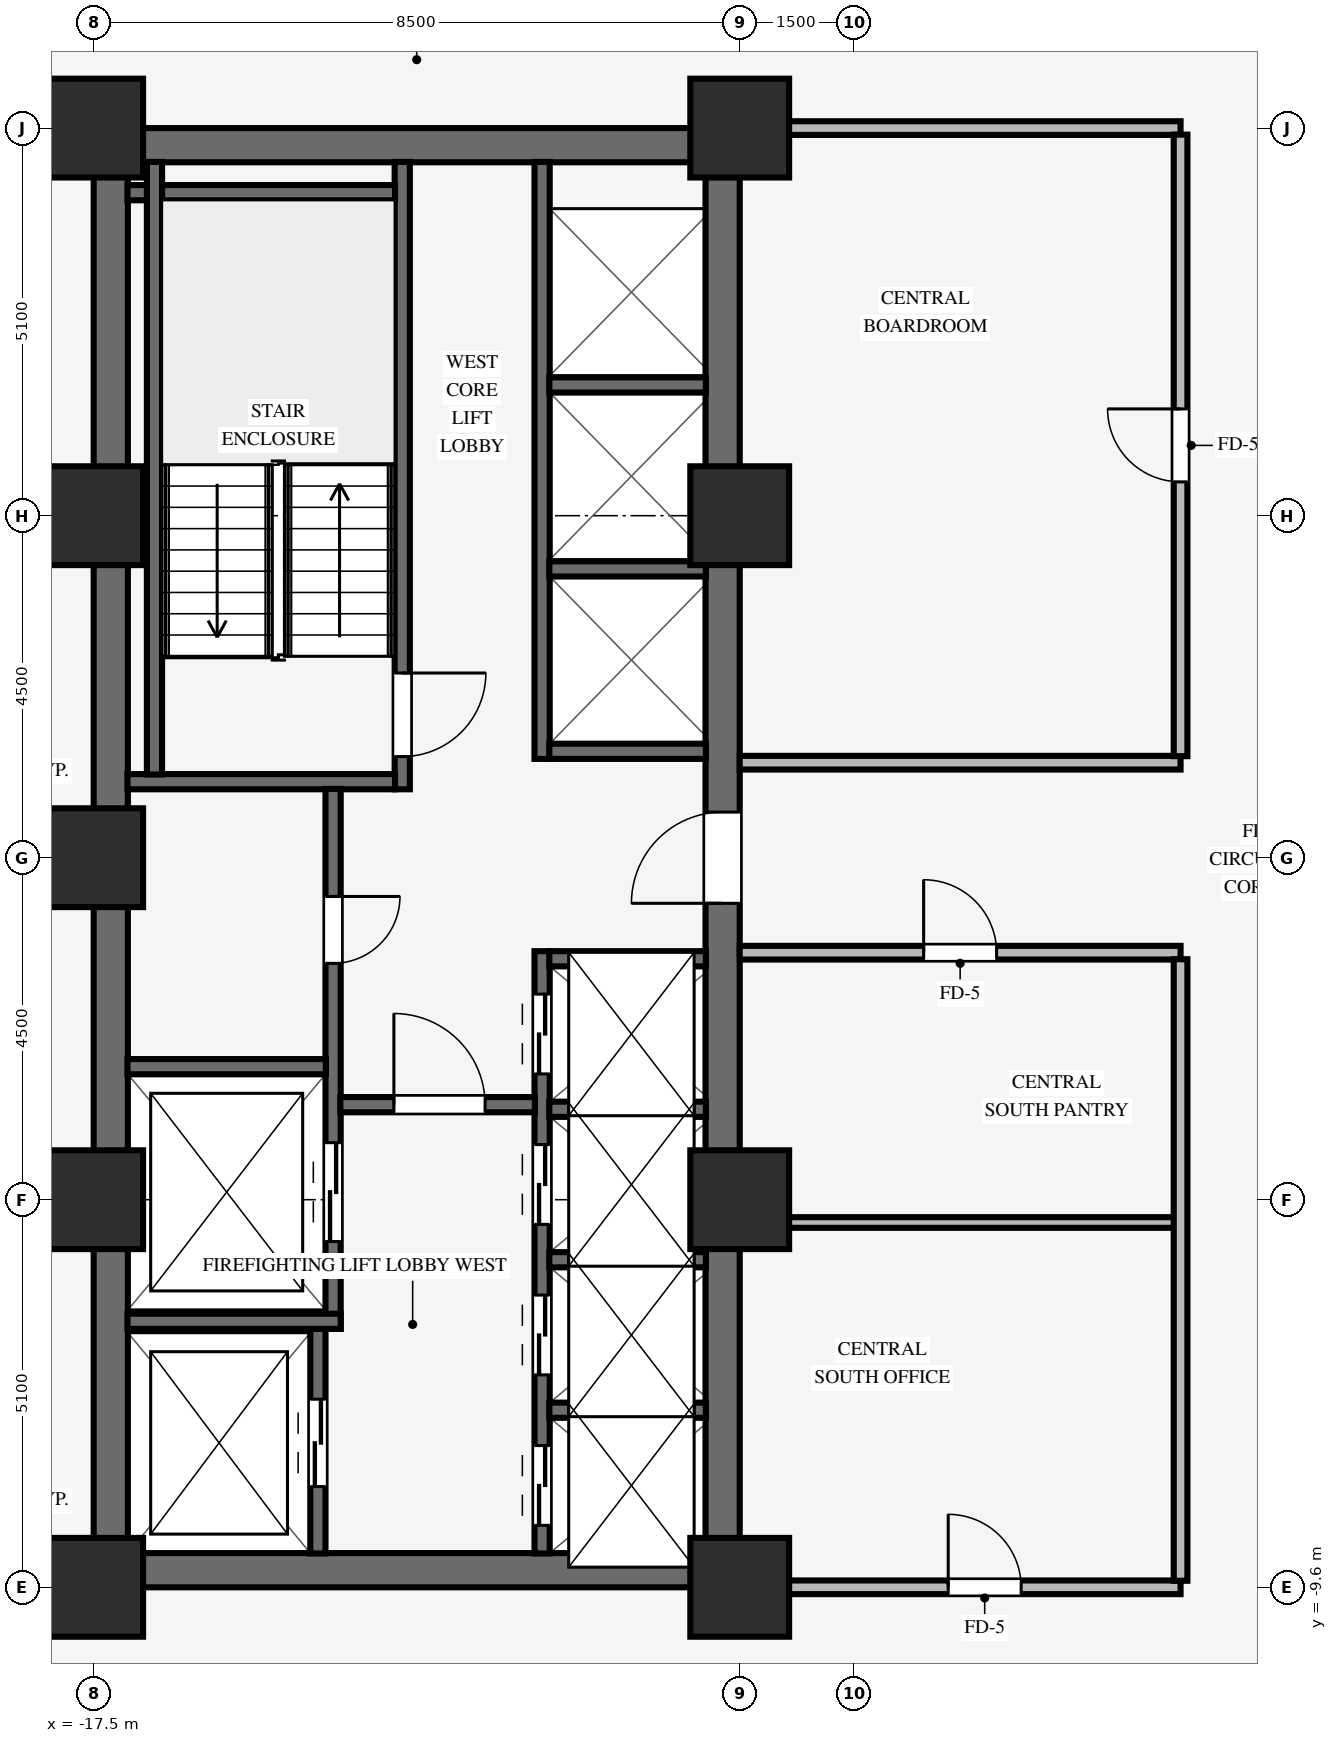
"""IFC4 building model, lengths in metres.
Left out: names, types, materials, properties, quantities, classifications, styles, units other than length and angle.
Written with IfcOpenShell. Run it as: python <this file> out.ifc"""

import sys

from ifc_helpers import new_model, si_unit, direction, frame, frame_2d, origin, origin_2d, place, context, subcontext, project, spatial, rectangle, extrude, source, transform, mapped, element, fill, save


model = new_model("IFC4")
c1 = context("Model", 3, precision=1e-05, world=origin(), true_north=direction((0.0, 1.0)))
c2 = subcontext(c1, "Body", "Model", "MODEL_VIEW")
j1 = project(units=[si_unit("LENGTHUNIT", "METRE"), si_unit("PLANEANGLEUNIT", "RADIAN")], contexts=[c1])
p1 = place(None, origin())
s1 = spatial("IfcSite", under=j1, at=p1, CompositionType="ELEMENT")
p2 = place(p1, origin())
s2 = spatial("IfcBuilding", under=s1, at=p2, CompositionType="ELEMENT")
p3 = place(p2, frame((0.0, 0.0, 53.15)))
s3 = spatial("IfcBuildingStorey", under=s2, at=p3, CompositionType="ELEMENT", Elevation=53.15)
for number, where, z_axis, x_axis in (
    (1, (-17.5, -9.375, 0.0), (0.0, 0.0, 1.0), (1.0, 0.0, 0.0)),
    (2, (-17.5, 9.375, 0.0), (0.0, 0.0, 1.0), (1.0, 0.0, 0.0)),
):
    element("IfcWall", number, at=place(p3, frame(where, z_axis=z_axis, x_axis=x_axis)), inside=s3, PredefinedType="SHEAR", context=c2, shape_type="SweptSolid", body=[
        extrude(rectangle(XDim=8.5, YDim=0.45, at=frame_2d((4.25, 0.0))), origin(), (0.0, 0.0, 1.0), 3.25),
    ])
p4 = place(p3, frame((-17.275, -9.155, 0.0), z_axis=(0.0, 0.0, 1.0), x_axis=(0.0, 1.0, 0.0)))
e3 = element("IfcWall", 3, at=p4, inside=s3, PredefinedType="SHEAR", context=c2, shape_type="SweptSolid", body=[
    extrude(rectangle(XDim=18.31, YDim=0.45, at=frame_2d((9.155, 0.0))), origin(), (0.0, 0.0, 1.0), 3.25),
])
p5 = place(p3, frame((-9.225, -9.155, 0.0), z_axis=(0.0, 0.0, 1.0), x_axis=(0.0, 1.0, 0.0)))
e4 = element("IfcWall", 4, at=p5, inside=s3, PredefinedType="SHEAR", context=c2, shape_type="SweptSolid", body=[
    extrude(rectangle(XDim=18.31, YDim=0.45, at=frame_2d((9.155, 0.0))), origin(), (0.0, 0.0, 1.0), 3.25),
])
p6 = place(p5, frame((8.555, 0.0, 0.0)))
e5 = element("IfcOpeningElement", 5, at=p6, cuts=e4, PredefinedType="OPENING", context=c2, shape_type="SweptSolid", body=[
    extrude(rectangle(XDim=1.2, YDim=2.15, at=frame_2d((0.6, 1.075))), frame((0.0, 0.235, 0.0), z_axis=(0.0, -1.0, 0.0), x_axis=(1.0, 0.0, 0.0)), (0.0, 0.0, 1.0), 0.47),
])
for number, where, z_axis, x_axis in (
    (6, (-17.5, -9.6, 0.0), (0.0, 0.0, 1.0), (1.0, 0.0, 0.0)),
    (7, (-17.5, -4.5, 0.0), (0.0, 0.0, 1.0), (1.0, 0.0, 0.0)),
    (8, (-17.5, 4.5, 0.0), (0.0, 0.0, 1.0), (1.0, 0.0, 0.0)),
    (9, (-17.5, 9.6, 0.0), (0.0, 0.0, 1.0), (1.0, 0.0, 0.0)),
    (10, (-9.0, -9.6, 0.0), (0.0, 0.0, 1.0), (1.0, 0.0, 0.0)),
    (11, (-9.0, -4.5, 0.0), (0.0, 0.0, 1.0), (1.0, 0.0, 0.0)),
    (12, (-9.0, 4.5, 0.0), (0.0, 0.0, 1.0), (1.0, 0.0, 0.0)),
    (13, (-9.0, 9.6, 0.0), (0.0, 0.0, 1.0), (1.0, 0.0, 0.0)),
    (14, (-17.5, 0.0, 0.0), (0.0, 0.0, 1.0), (1.0, 0.0, 0.0)),
):
    element("IfcColumn", number, at=place(p3, frame(where, z_axis=z_axis, x_axis=x_axis)), inside=s3, PredefinedType="COLUMN", context=c2, shape_type="SweptSolid", body=[
        extrude(rectangle(XDim=1.3, YDim=1.3, at=origin_2d()), origin(), (0.0, 0.0, 1.0), 3.25),
    ])
p7 = place(p3, frame((-13.44, 0.9, 0.0), z_axis=(0.0, 0.0, 1.0), x_axis=(0.0, 1.0, 0.0)))
e15 = element("IfcWall", 15, at=p7, inside=s3, PredefinedType="SHEAR", context=c2, shape_type="SweptSolid", body=[
    extrude(rectangle(XDim=8.255, YDim=0.2, at=frame_2d((4.127, 0.0))), origin(), (0.0, 0.0, 1.0), 3.25),
])
p8 = place(p7, frame((1.53, 0.0, 0.0), z_axis=(0.0, 0.0, 1.0), x_axis=(-1.0, 0.0, 0.0)))
e16 = element("IfcOpeningElement", 16, at=p8, cuts=e15, PredefinedType="OPENING", context=c2, shape_type="SweptSolid", body=[
    extrude(rectangle(XDim=1.1, YDim=2.15, at=frame_2d((0.55, 1.075))), frame((0.0, 0.11, 0.0), z_axis=(0.0, -1.0, 0.0), x_axis=(1.0, 0.0, 0.0)), (0.0, 0.0, 1.0), 0.22),
])
for number, where, z_axis, x_axis in (
    (17, (-17.055, 1.0, 0.0), (0.0, 0.0, 1.0), (1.0, 0.0, 0.0)),
    (18, (-17.055, 8.75, 0.0), (0.0, 0.0, 1.0), (1.0, 0.0, 0.0)),
):
    element("IfcWall", number, at=place(p3, frame(where, z_axis=z_axis, x_axis=x_axis)), inside=s3, PredefinedType="SHEAR", context=c2, shape_type="SweptSolid", body=[
        extrude(rectangle(XDim=3.52, YDim=0.2, at=frame_2d((1.76, 0.0))), origin(), (0.0, 0.0, 1.0), 3.25),
    ])
p9 = place(p3, frame((-16.7, 1.095, 0.0), z_axis=(0.0, 0.0, 1.0), x_axis=(0.0, 1.0, 0.0)))
e19 = element("IfcWall", 19, at=p9, inside=s3, PredefinedType="SHEAR", context=c2, shape_type="SweptSolid", body=[
    extrude(rectangle(XDim=8.06, YDim=0.2, at=frame_2d((4.03, 0.0))), origin(), (0.0, 0.0, 1.0), 3.25),
])
p10 = place(p3, frame((-14.55, -9.155, 0.0), z_axis=(0.0, 0.0, 1.0), x_axis=(0.0, 1.0, 0.0)))
e20 = element("IfcWall", 20, at=p10, inside=s3, PredefinedType="SHEAR", context=c2, shape_type="SweptSolid", body=[
    extrude(rectangle(XDim=2.96, YDim=0.2, at=frame_2d((1.48, 0.0))), origin(), (0.0, 0.0, 1.0), 3.25),
])
p11 = place(p10, frame((0.88, 0.0, 0.0)))
e21 = element("IfcOpeningElement", 21, at=p11, cuts=e20, PredefinedType="OPENING", context=c2, shape_type="SweptSolid", body=[
    extrude(rectangle(XDim=1.15, YDim=2.15, at=frame_2d((0.575, 1.075))), frame((0.0, 0.11, 0.0), z_axis=(0.0, -1.0, 0.0), x_axis=(1.0, 0.0, 0.0)), (0.0, 0.0, 1.0), 0.22),
])
p12 = place(p3, frame((-14.35, -6.2, 0.0), z_axis=(0.0, 0.0, 1.0), x_axis=(0.0, 1.0, 0.0)))
e22 = element("IfcWall", 22, at=p12, inside=s3, PredefinedType="SHEAR", context=c2, shape_type="SweptSolid", body=[
    extrude(rectangle(XDim=7.105, YDim=0.2, at=frame_2d((3.552, 0.0))), origin(), (0.0, 0.0, 1.0), 3.25),
])
p13 = place(p12, frame((5.69, 0.0, 0.0), z_axis=(0.0, 0.0, 1.0), x_axis=(-1.0, 0.0, 0.0)))
e23 = element("IfcOpeningElement", 23, at=p13, cuts=e22, PredefinedType="OPENING", context=c2, shape_type="SweptSolid", body=[
    extrude(rectangle(XDim=0.88, YDim=2.1, at=frame_2d((0.44, 1.05))), frame((0.0, 0.11, 0.0), z_axis=(0.0, -1.0, 0.0), x_axis=(1.0, 0.0, 0.0)), (0.0, 0.0, 1.0), 0.22),
])
p14 = place(p12, frame((1.15, 0.0, 0.0)))
e24 = element("IfcOpeningElement", 24, at=p14, cuts=e22, PredefinedType="OPENING", context=c2, shape_type="SweptSolid", body=[
    extrude(rectangle(XDim=1.3, YDim=2.2, at=frame_2d((0.65, 1.1))), frame((0.0, 0.11, 0.0), z_axis=(0.0, -1.0, 0.0), x_axis=(1.0, 0.0, 0.0)), (0.0, 0.0, 1.0), 0.22),
])
p15 = place(p3, frame((-17.055, -6.1, 0.0), z_axis=(0.0, 0.0, 1.0), x_axis=(1.0, 0.0, 0.0)))
e25 = element("IfcWall", 25, at=p15, inside=s3, PredefinedType="SHEAR", context=c2, shape_type="SweptSolid", body=[
    extrude(rectangle(XDim=2.805, YDim=0.2, at=frame_2d((1.402, 0.0))), origin(), (0.0, 0.0, 1.0), 3.25),
])
p16 = place(p3, frame((-17.055, -2.75, 0.0), z_axis=(0.0, 0.0, 1.0), x_axis=(1.0, 0.0, 0.0)))
e26 = element("IfcWall", 26, at=p16, inside=s3, PredefinedType="SHEAR", context=c2, shape_type="SweptSolid", body=[
    extrude(rectangle(XDim=2.61, YDim=0.2, at=frame_2d((1.305, 0.0))), origin(), (0.0, 0.0, 1.0), 3.25),
])
p17 = place(p3, frame((-11.6, -9.155, 0.0), z_axis=(0.0, 0.0, 1.0), x_axis=(0.0, 1.0, 0.0)))
e27 = element("IfcWall", 27, at=p17, inside=s3, PredefinedType="SHEAR", context=c2, shape_type="SweptSolid", body=[
    extrude(rectangle(XDim=7.925, YDim=0.2, at=frame_2d((3.962, 0.0))), origin(), (0.0, 0.0, 1.0), 3.25),
])
p18 = place(p17, frame((0.37, 0.0, 0.0)))
e28 = element("IfcOpeningElement", 28, at=p18, cuts=e27, PredefinedType="OPENING", context=c2, shape_type="SweptSolid", body=[
    extrude(rectangle(XDim=1.05, YDim=2.15, at=frame_2d((0.525, 1.075))), frame((0.0, 0.11, 0.0), z_axis=(0.0, -1.0, 0.0), x_axis=(1.0, 0.0, 0.0)), (0.0, 0.0, 1.0), 0.22),
])
p19 = place(p17, frame((2.35, 0.0, 0.0)))
e29 = element("IfcOpeningElement", 29, at=p19, cuts=e27, PredefinedType="OPENING", context=c2, shape_type="SweptSolid", body=[
    extrude(rectangle(XDim=1.05, YDim=2.15, at=frame_2d((0.525, 1.075))), frame((0.0, 0.11, 0.0), z_axis=(0.0, -1.0, 0.0), x_axis=(1.0, 0.0, 0.0)), (0.0, 0.0, 1.0), 0.22),
])
p20 = place(p17, frame((4.33, 0.0, 0.0)))
e30 = element("IfcOpeningElement", 30, at=p20, cuts=e27, PredefinedType="OPENING", context=c2, shape_type="SweptSolid", body=[
    extrude(rectangle(XDim=1.05, YDim=2.15, at=frame_2d((0.525, 1.075))), frame((0.0, 0.11, 0.0), z_axis=(0.0, -1.0, 0.0), x_axis=(1.0, 0.0, 0.0)), (0.0, 0.0, 1.0), 0.22),
])
p21 = place(p17, frame((6.31, 0.0, 0.0)))
e31 = element("IfcOpeningElement", 31, at=p21, cuts=e27, PredefinedType="OPENING", context=c2, shape_type="SweptSolid", body=[
    extrude(rectangle(XDim=1.05, YDim=2.15, at=frame_2d((0.525, 1.075))), frame((0.0, 0.11, 0.0), z_axis=(0.0, -1.0, 0.0), x_axis=(1.0, 0.0, 0.0)), (0.0, 0.0, 1.0), 0.22),
])
p22 = place(p3, frame((-14.255, -3.25, 0.0), z_axis=(0.0, 0.0, 1.0), x_axis=(1.0, 0.0, 0.0)))
e32 = element("IfcWall", 32, at=p22, inside=s3, PredefinedType="SHEAR", context=c2, shape_type="SweptSolid", body=[
    extrude(rectangle(XDim=2.56, YDim=0.2, at=frame_2d((1.28, 0.0))), origin(), (0.0, 0.0, 1.0), 3.25),
])
p23 = place(p22, frame((0.705, 0.0, 0.0)))
e33 = element("IfcOpeningElement", 33, at=p23, cuts=e32, PredefinedType="OPENING", context=c2, shape_type="SweptSolid", body=[
    extrude(rectangle(XDim=1.2, YDim=2.15, at=frame_2d((0.6, 1.075))), frame((0.0, 0.11, 0.0), z_axis=(0.0, -1.0, 0.0), x_axis=(1.0, 0.0, 0.0)), (0.0, 0.0, 1.0), 0.22),
])
for number, where, z_axis, x_axis in (
    (34, (-11.505, -7.27, 0.0), (0.0, 0.0, 1.0), (1.0, 0.0, 0.0)),
    (35, (-11.505, -5.29, 0.0), (0.0, 0.0, 1.0), (1.0, 0.0, 0.0)),
    (36, (-11.505, -3.31, 0.0), (0.0, 0.0, 1.0), (1.0, 0.0, 0.0)),
    (37, (-11.505, -1.33, 0.0), (0.0, 0.0, 1.0), (1.0, 0.0, 0.0)),
):
    element("IfcWall", number, at=place(p3, frame(where, z_axis=z_axis, x_axis=x_axis)), inside=s3, PredefinedType="SHEAR", context=c2, shape_type="SweptSolid", body=[
        extrude(rectangle(XDim=2.06, YDim=0.2, at=frame_2d((1.03, 0.0))), origin(), (0.0, 0.0, 1.0), 3.25),
    ])
p24 = place(p3, frame((-11.6, 1.3, 0.0), z_axis=(0.0, 0.0, 1.0), x_axis=(0.0, 1.0, 0.0)))
e38 = element("IfcWall", 38, at=p24, inside=s3, PredefinedType="SHEAR", context=c2, shape_type="SweptSolid", body=[
    extrude(rectangle(XDim=7.855, YDim=0.2, at=frame_2d((3.927, 0.0))), origin(), (0.0, 0.0, 1.0), 3.25),
])
for number, where, z_axis, x_axis in (
    (39, (-11.505, 1.4, 0.0), (0.0, 0.0, 1.0), (1.0, 0.0, 0.0)),
    (40, (-11.505, 3.8, 0.0), (0.0, 0.0, 1.0), (1.0, 0.0, 0.0)),
    (41, (-11.505, 6.22, 0.0), (0.0, 0.0, 1.0), (1.0, 0.0, 0.0)),
):
    element("IfcWall", number, at=place(p3, frame(where, z_axis=z_axis, x_axis=x_axis)), inside=s3, PredefinedType="SHEAR", context=c2, shape_type="SweptSolid", body=[
        extrude(rectangle(XDim=2.06, YDim=0.2, at=frame_2d((1.03, 0.0))), origin(), (0.0, 0.0, 1.0), 3.25),
    ])
p25 = place(p3, frame((-8.354, -9.6, 0.0), z_axis=(0.0, 0.0, 1.0), x_axis=(1.0, 0.0, 0.0)))
e42 = element("IfcWall", 42, at=p25, inside=s3, PredefinedType="PARTITIONING", context=c2, shape_type="SweptSolid", body=[
    extrude(rectangle(XDim=5.154, YDim=0.18, at=frame_2d((2.577, 0.0))), origin(), (0.0, 0.0, 1.0), 2.285),
])
p26 = place(p25, frame((2.097, 0.0, 0.0)))
e43 = element("IfcOpeningElement", 43, at=p26, cuts=e42, PredefinedType="OPENING", context=c2, shape_type="SweptSolid", body=[
    extrude(rectangle(XDim=0.96, YDim=2.1, at=frame_2d((0.48, 1.05))), frame((0.0, 0.1, 0.0), z_axis=(0.0, -1.0, 0.0), x_axis=(1.0, 0.0, 0.0)), (0.0, 0.0, 1.0), 0.2),
])
p27 = place(p3, frame((-8.354, -4.8, 0.0), z_axis=(0.0, 0.0, 1.0), x_axis=(1.0, 0.0, 0.0)))
e44 = element("IfcWall", 44, at=p27, inside=s3, PredefinedType="PARTITIONING", context=c2, shape_type="SweptSolid", body=[
    extrude(rectangle(XDim=5.068, YDim=0.14, at=frame_2d((2.534, 0.0))), origin(), (0.0, 0.0, 1.0), 2.618),
])
p28 = place(p3, frame((-9.0, -1.25, 0.0), z_axis=(0.0, 0.0, 1.0), x_axis=(1.0, 0.0, 0.0)))
e45 = element("IfcWall", 45, at=p28, inside=s3, PredefinedType="PARTITIONING", context=c2, shape_type="SweptSolid", body=[
    extrude(rectangle(XDim=5.8, YDim=0.18, at=frame_2d((2.9, 0.0))), origin(), (0.0, 0.0, 1.0), 3.24),
])
p29 = place(p28, frame((2.42, 0.0, 0.0)))
e46 = element("IfcOpeningElement", 46, at=p29, cuts=e45, PredefinedType="OPENING", context=c2, shape_type="SweptSolid", body=[
    extrude(rectangle(XDim=0.96, YDim=2.1, at=frame_2d((0.48, 1.05))), frame((0.0, 0.1, 0.0), z_axis=(0.0, -1.0, 0.0), x_axis=(1.0, 0.0, 0.0)), (0.0, 0.0, 1.0), 0.2),
])
p30 = place(p3, frame((-9.0, 1.25, 0.0), z_axis=(0.0, 0.0, 1.0), x_axis=(1.0, 0.0, 0.0)))
e47 = element("IfcWall", 47, at=p30, inside=s3, PredefinedType="PARTITIONING", context=c2, shape_type="SweptSolid", body=[
    extrude(rectangle(XDim=5.8, YDim=0.18, at=frame_2d((2.9, 0.0))), origin(), (0.0, 0.0, 1.0), 3.24),
])
p31 = place(p3, frame((-8.354, 9.6, 0.0), z_axis=(0.0, 0.0, 1.0), x_axis=(1.0, 0.0, 0.0)))
e48 = element("IfcWall", 48, at=p31, inside=s3, PredefinedType="PARTITIONING", context=c2, shape_type="SweptSolid", body=[
    extrude(rectangle(XDim=5.154, YDim=0.18, at=frame_2d((2.577, 0.0))), origin(), (0.0, 0.0, 1.0), 2.285),
])
p32 = place(p3, frame((-3.2, -9.514, 0.0), z_axis=(0.0, 0.0, 1.0), x_axis=(0.0, 1.0, 0.0)))
e49 = element("IfcWall", 49, at=p32, inside=s3, PredefinedType="PARTITIONING", context=c2, shape_type="SweptSolid", body=[
    extrude(rectangle(XDim=8.178, YDim=0.18, at=frame_2d((4.089, 0.0))), origin(), (0.0, 0.0, 1.0), 3.24),
])
p33 = place(p3, frame((-3.2, 1.336, 0.0), z_axis=(0.0, 0.0, 1.0), x_axis=(0.0, 1.0, 0.0)))
e50 = element("IfcWall", 50, at=p33, inside=s3, PredefinedType="PARTITIONING", context=c2, shape_type="SweptSolid", body=[
    extrude(rectangle(XDim=8.178, YDim=0.18, at=frame_2d((4.089, 0.0))), origin(), (0.0, 0.0, 1.0), 3.24),
])
p34 = place(p33, frame((3.609, 0.0, 0.0)))
e51 = element("IfcOpeningElement", 51, at=p34, cuts=e50, PredefinedType="OPENING", context=c2, shape_type="SweptSolid", body=[
    extrude(rectangle(XDim=0.96, YDim=2.1, at=frame_2d((0.48, 1.05))), frame((0.0, 0.1, 0.0), z_axis=(0.0, -1.0, 0.0), x_axis=(1.0, 0.0, 0.0)), (0.0, 0.0, 1.0), 0.2),
])
m1 = source(origin(), c2, "Body", "SweptSolid", [
    extrude(rectangle(XDim=1.1, YDim=2.15, at=frame_2d((0.55, 1.075))), frame((0.0, 0.025, 0.0), z_axis=(0.0, -1.0, 0.0), x_axis=(1.0, 0.0, 0.0)), (0.0, 0.0, 1.0), 0.05),
])
p35 = place(p8, origin())
e52 = element("IfcDoor", 52, at=p35, inside=s3, OperationType="SINGLE_SWING_LEFT", PredefinedType="DOOR", context=c2, shape_type="MappedRepresentation", body=[
    mapped(m1, transform((0.0, 0.0, 0.0), scale=1.0)),
])
fill(e16, e52)
m2 = source(origin(), c2, "Body", "SweptSolid", [
    extrude(rectangle(XDim=0.88, YDim=2.1, at=frame_2d((0.44, 1.05))), frame((0.0, 0.025, 0.0), z_axis=(0.0, -1.0, 0.0), x_axis=(1.0, 0.0, 0.0)), (0.0, 0.0, 1.0), 0.05),
])
p36 = place(p13, origin())
e53 = element("IfcDoor", 53, at=p36, inside=s3, OperationType="SINGLE_SWING_LEFT", PredefinedType="DOOR", context=c2, shape_type="MappedRepresentation", body=[
    mapped(m2, transform((0.0, 0.0, 0.0), scale=1.0)),
])
fill(e23, e53)
m3 = source(origin(), c2, "Body", "SweptSolid", [
    extrude(rectangle(XDim=1.2, YDim=2.15, at=frame_2d((0.6, 1.075))), frame((0.0, 0.025, 0.0), z_axis=(0.0, -1.0, 0.0), x_axis=(1.0, 0.0, 0.0)), (0.0, 0.0, 1.0), 0.05),
])
p37 = place(p23, origin())
e54 = element("IfcDoor", 54, at=p37, inside=s3, OperationType="SINGLE_SWING_LEFT", PredefinedType="DOOR", context=c2, shape_type="MappedRepresentation", body=[
    mapped(m3, transform((0.0, 0.0, 0.0), scale=1.0)),
])
fill(e33, e54)
p38 = place(p6, origin())
e55 = element("IfcDoor", 55, at=p38, inside=s3, OperationType="SINGLE_SWING_LEFT", PredefinedType="DOOR", context=c2, shape_type="MappedRepresentation", body=[
    mapped(m3, transform((0.0, 0.0, 0.0), scale=1.0)),
])
fill(e5, e55)
m4 = source(origin(), c2, "Body", "SweptSolid", [
    extrude(rectangle(XDim=1.15, YDim=2.15, at=frame_2d((0.575, 1.075))), frame((0.0, 0.025, 0.0), z_axis=(0.0, -1.0, 0.0), x_axis=(1.0, 0.0, 0.0)), (0.0, 0.0, 1.0), 0.05),
])
p39 = place(p11, origin())
e56 = element("IfcDoor", 56, at=p39, inside=s3, OperationType="DOUBLE_DOOR_SLIDING", PredefinedType="DOOR", context=c2, shape_type="MappedRepresentation", body=[
    mapped(m4, transform((0.0, 0.0, 0.0), scale=1.0)),
])
fill(e21, e56)
m5 = source(origin(), c2, "Body", "SweptSolid", [
    extrude(rectangle(XDim=1.3, YDim=2.2, at=frame_2d((0.65, 1.1))), frame((0.0, 0.025, 0.0), z_axis=(0.0, -1.0, 0.0), x_axis=(1.0, 0.0, 0.0)), (0.0, 0.0, 1.0), 0.05),
])
p40 = place(p14, origin())
e57 = element("IfcDoor", 57, at=p40, inside=s3, OperationType="DOUBLE_DOOR_SLIDING", PredefinedType="DOOR", context=c2, shape_type="MappedRepresentation", body=[
    mapped(m5, transform((0.0, 0.0, 0.0), scale=1.0)),
])
fill(e24, e57)
m6 = source(origin(), c2, "Body", "SweptSolid", [
    extrude(rectangle(XDim=1.05, YDim=2.15, at=frame_2d((0.525, 1.075))), frame((0.0, 0.025, 0.0), z_axis=(0.0, -1.0, 0.0), x_axis=(1.0, 0.0, 0.0)), (0.0, 0.0, 1.0), 0.05),
])
p41 = place(p18, origin())
e58 = element("IfcDoor", 58, at=p41, inside=s3, OperationType="DOUBLE_DOOR_SLIDING", PredefinedType="DOOR", context=c2, shape_type="MappedRepresentation", body=[
    mapped(m6, transform((0.0, 0.0, 0.0), scale=1.0)),
])
fill(e28, e58)
p42 = place(p19, origin())
e59 = element("IfcDoor", 59, at=p42, inside=s3, OperationType="DOUBLE_DOOR_SLIDING", PredefinedType="DOOR", context=c2, shape_type="MappedRepresentation", body=[
    mapped(m6, transform((0.0, 0.0, 0.0), scale=1.0)),
])
fill(e29, e59)
p43 = place(p20, origin())
e60 = element("IfcDoor", 60, at=p43, inside=s3, OperationType="DOUBLE_DOOR_SLIDING", PredefinedType="DOOR", context=c2, shape_type="MappedRepresentation", body=[
    mapped(m6, transform((0.0, 0.0, 0.0), scale=1.0)),
])
fill(e30, e60)
p44 = place(p21, origin())
e61 = element("IfcDoor", 61, at=p44, inside=s3, OperationType="DOUBLE_DOOR_SLIDING", PredefinedType="DOOR", context=c2, shape_type="MappedRepresentation", body=[
    mapped(m6, transform((0.0, 0.0, 0.0), scale=1.0)),
])
fill(e31, e61)
m7 = source(origin(), c2, "Body", "SweptSolid", [
    extrude(rectangle(XDim=0.96, YDim=2.1, at=frame_2d((0.48, 1.05))), frame((0.0, 0.025, 0.0), z_axis=(0.0, -1.0, 0.0), x_axis=(1.0, 0.0, 0.0)), (0.0, 0.0, 1.0), 0.05),
])
p45 = place(p34, origin())
e62 = element("IfcDoor", 62, at=p45, inside=s3, OperationType="SINGLE_SWING_RIGHT", PredefinedType="DOOR", context=c2, shape_type="MappedRepresentation", body=[
    mapped(m7, transform((0.0, 0.0, 0.0), scale=1.0)),
])
fill(e51, e62)
p46 = place(p29, origin())
e63 = element("IfcDoor", 63, at=p46, inside=s3, OperationType="SINGLE_SWING_LEFT", PredefinedType="DOOR", context=c2, shape_type="MappedRepresentation", body=[
    mapped(m7, transform((0.0, 0.0, 0.0), scale=1.0)),
])
fill(e46, e63)
p47 = place(p26, origin())
e64 = element("IfcDoor", 64, at=p47, inside=s3, OperationType="SINGLE_SWING_LEFT", PredefinedType="DOOR", context=c2, shape_type="MappedRepresentation", body=[
    mapped(m7, transform((0.0, 0.0, 0.0), scale=1.0)),
])
fill(e43, e64)
save(model, sys.argv[1])
